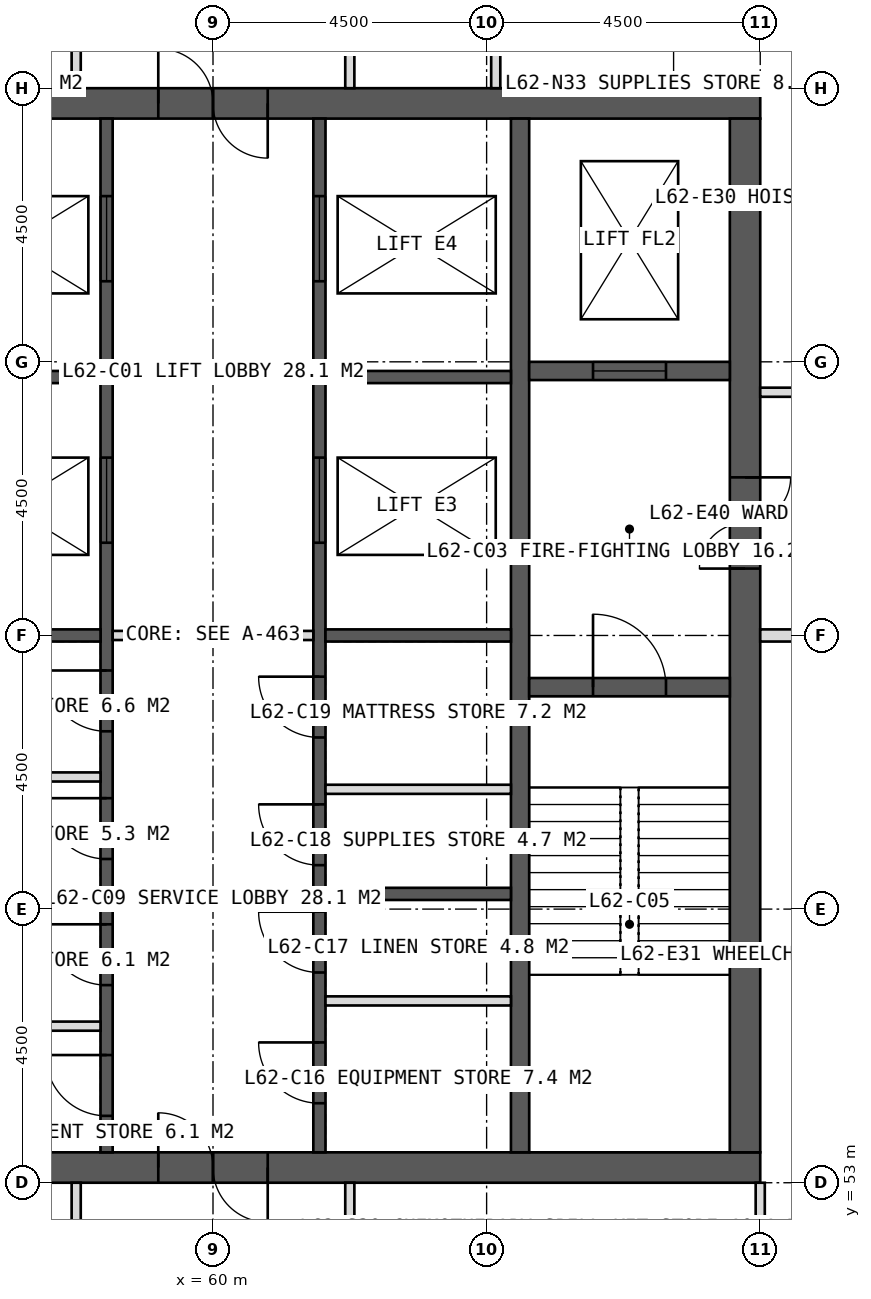
"""IFC4 building model, lengths in metres.
Left out: names, types, materials, properties, quantities, classifications, styles, units other than length and angle.
Written with IfcOpenShell. Run it as: python <this file> out.ifc"""

import sys

from ifc_helpers import new_model, si_unit, direction, frame, frame_2d, origin, place, context, subcontext, project, spatial, rectangle, extrude, element, fill, save


model = new_model("IFC4")
c1 = context("Model", 3, precision=1e-05, world=origin(), true_north=direction((0.0, 1.0)))
c2 = subcontext(c1, "Body", "Model", "MODEL_VIEW")
j1 = project(units=[si_unit("LENGTHUNIT", "METRE"), si_unit("PLANEANGLEUNIT", "RADIAN")], contexts=[c1])
p1 = place(None, origin())
s1 = spatial("IfcSite", under=j1, at=p1, CompositionType="ELEMENT")
p2 = place(p1, origin())
s2 = spatial("IfcBuilding", under=s1, at=p2, CompositionType="ELEMENT")
p3 = place(p2, frame((0.0, 0.0, 258.0)))
s3 = spatial("IfcBuildingStorey", under=s2, at=p3, CompositionType="ELEMENT", Elevation=258.0)
p4 = place(p3, frame((51.0, 70.75, 0.0), z_axis=(0.0, 0.0, 1.0), x_axis=(1.0, 0.0, 0.0)))
e1 = element("IfcWall", 1, at=p4, inside=s3, PredefinedType="SHEAR", context=c2, shape_type="SweptSolid", body=[
    extrude(rectangle(XDim=18.0, YDim=0.5, at=frame_2d((9.0, 0.0))), origin(), (0.0, 0.0, 1.0), 4.0),
])
p5 = place(p4, frame((8.1, 0.0, 0.0)))
e2 = element("IfcOpeningElement", 2, at=p5, cuts=e1, PredefinedType="OPENING", context=c2, shape_type="SweptSolid", body=[
    extrude(rectangle(XDim=1.8, YDim=2.2, at=frame_2d((0.9, 1.1))), frame((0.0, 0.26, 0.0), z_axis=(0.0, -1.0, 0.0), x_axis=(1.0, 0.0, 0.0)), (0.0, 0.0, 1.0), 0.52),
])
p6 = place(p3, frame((51.0, 53.25, 0.0), z_axis=(0.0, 0.0, 1.0), x_axis=(1.0, 0.0, 0.0)))
e3 = element("IfcWall", 3, at=p6, inside=s3, PredefinedType="SHEAR", context=c2, shape_type="SweptSolid", body=[
    extrude(rectangle(XDim=18.0, YDim=0.5, at=frame_2d((9.0, 0.0))), origin(), (0.0, 0.0, 1.0), 4.0),
])
p7 = place(p6, frame((8.1, 0.0, 0.0)))
e4 = element("IfcOpeningElement", 4, at=p7, cuts=e3, PredefinedType="OPENING", context=c2, shape_type="SweptSolid", body=[
    extrude(rectangle(XDim=1.8, YDim=2.2, at=frame_2d((0.9, 1.1))), frame((0.0, 0.26, 0.0), z_axis=(0.0, -1.0, 0.0), x_axis=(1.0, 0.0, 0.0)), (0.0, 0.0, 1.0), 0.52),
])
p8 = place(p3, frame((68.75, 53.5, 0.0), z_axis=(0.0, 0.0, 1.0), x_axis=(0.0, 1.0, 0.0)))
e5 = element("IfcWall", 5, at=p8, inside=s3, PredefinedType="SHEAR", context=c2, shape_type="SweptSolid", body=[
    extrude(rectangle(XDim=17.0, YDim=0.5, at=frame_2d((8.5, 0.0))), origin(), (0.0, 0.0, 1.0), 4.0),
])
p9 = place(p8, frame((9.6, 0.0, 0.0)))
e6 = element("IfcOpeningElement", 6, at=p9, cuts=e5, PredefinedType="OPENING", context=c2, shape_type="SweptSolid", body=[
    extrude(rectangle(XDim=1.5, YDim=2.2, at=frame_2d((0.75, 1.1))), frame((0.0, 0.26, 0.0), z_axis=(0.0, -1.0, 0.0), x_axis=(1.0, 0.0, 0.0)), (0.0, 0.0, 1.0), 0.52),
])
p10 = place(p3, frame((65.05, 53.5, 0.0), z_axis=(0.0, 0.0, 1.0), x_axis=(0.0, 1.0, 0.0)))
e7 = element("IfcWall", 7, at=p10, inside=s3, PredefinedType="SHEAR", context=c2, shape_type="SweptSolid", body=[
    extrude(rectangle(XDim=17.0, YDim=0.3, at=frame_2d((8.5, 0.0))), origin(), (0.0, 0.0, 1.0), 4.0),
])
p11 = place(p3, frame((58.25, 53.5, 0.0), z_axis=(0.0, 0.0, 1.0), x_axis=(0.0, 1.0, 0.0)))
e8 = element("IfcWall", 8, at=p11, inside=s3, PredefinedType="SHEAR", context=c2, shape_type="SweptSolid", body=[
    extrude(rectangle(XDim=17.0, YDim=0.2, at=frame_2d((8.5, 0.0))), origin(), (0.0, 0.0, 1.0), 4.0),
])
p12 = place(p11, frame((0.6, 0.0, 0.0)))
e9 = element("IfcOpeningElement", 9, at=p12, cuts=e8, PredefinedType="OPENING", context=c2, shape_type="SweptSolid", body=[
    extrude(rectangle(XDim=1.0, YDim=2.1, at=frame_2d((0.5, 1.05))), frame((0.0, 0.11, 0.0), z_axis=(0.0, -1.0, 0.0), x_axis=(1.0, 0.0, 0.0)), (0.0, 0.0, 1.0), 0.22),
])
p13 = place(p11, frame((2.75, 0.0, 0.0)))
e10 = element("IfcOpeningElement", 10, at=p13, cuts=e8, PredefinedType="OPENING", context=c2, shape_type="SweptSolid", body=[
    extrude(rectangle(XDim=1.0, YDim=2.1, at=frame_2d((0.5, 1.05))), frame((0.0, 0.11, 0.0), z_axis=(0.0, -1.0, 0.0), x_axis=(1.0, 0.0, 0.0)), (0.0, 0.0, 1.0), 0.22),
])
p14 = place(p11, frame((4.824, 0.0, 0.0)))
e11 = element("IfcOpeningElement", 11, at=p14, cuts=e8, PredefinedType="OPENING", context=c2, shape_type="SweptSolid", body=[
    extrude(rectangle(XDim=1.0, YDim=2.1, at=frame_2d((0.5, 1.05))), frame((0.0, 0.11, 0.0), z_axis=(0.0, -1.0, 0.0), x_axis=(1.0, 0.0, 0.0)), (0.0, 0.0, 1.0), 0.22),
])
p15 = place(p11, frame((6.924, 0.0, 0.0)))
e12 = element("IfcOpeningElement", 12, at=p15, cuts=e8, PredefinedType="OPENING", context=c2, shape_type="SweptSolid", body=[
    extrude(rectangle(XDim=1.0, YDim=2.1, at=frame_2d((0.5, 1.05))), frame((0.0, 0.11, 0.0), z_axis=(0.0, -1.0, 0.0), x_axis=(1.0, 0.0, 0.0)), (0.0, 0.0, 1.0), 0.22),
])
p16 = place(p11, frame((10.025, 0.0, 0.0)))
e13 = element("IfcOpeningElement", 13, at=p16, cuts=e8, PredefinedType="OPENING", context=c2, shape_type="SweptSolid", body=[
    extrude(rectangle(XDim=1.4, YDim=2.2, at=frame_2d((0.7, 1.1))), frame((0.0, 0.11, 0.0), z_axis=(0.0, -1.0, 0.0), x_axis=(1.0, 0.0, 0.0)), (0.0, 0.0, 1.0), 0.22),
])
p17 = place(p11, frame((14.325, 0.0, 0.0)))
e14 = element("IfcOpeningElement", 14, at=p17, cuts=e8, PredefinedType="OPENING", context=c2, shape_type="SweptSolid", body=[
    extrude(rectangle(XDim=1.4, YDim=2.2, at=frame_2d((0.7, 1.1))), frame((0.0, 0.11, 0.0), z_axis=(0.0, -1.0, 0.0), x_axis=(1.0, 0.0, 0.0)), (0.0, 0.0, 1.0), 0.22),
])
p18 = place(p3, frame((61.75, 53.5, 0.0), z_axis=(0.0, 0.0, 1.0), x_axis=(0.0, 1.0, 0.0)))
e15 = element("IfcWall", 15, at=p18, inside=s3, PredefinedType="SHEAR", context=c2, shape_type="SweptSolid", body=[
    extrude(rectangle(XDim=17.0, YDim=0.2, at=frame_2d((8.5, 0.0))), origin(), (0.0, 0.0, 1.0), 4.0),
])
p19 = place(p18, frame((0.808, 0.0, 0.0)))
e16 = element("IfcOpeningElement", 16, at=p19, cuts=e15, PredefinedType="OPENING", context=c2, shape_type="SweptSolid", body=[
    extrude(rectangle(XDim=1.0, YDim=2.1, at=frame_2d((0.5, 1.05))), frame((0.0, 0.11, 0.0), z_axis=(0.0, -1.0, 0.0), x_axis=(1.0, 0.0, 0.0)), (0.0, 0.0, 1.0), 0.22),
])
p20 = place(p18, frame((2.958, 0.0, 0.0)))
e17 = element("IfcOpeningElement", 17, at=p20, cuts=e15, PredefinedType="OPENING", context=c2, shape_type="SweptSolid", body=[
    extrude(rectangle(XDim=1.0, YDim=2.1, at=frame_2d((0.5, 1.05))), frame((0.0, 0.11, 0.0), z_axis=(0.0, -1.0, 0.0), x_axis=(1.0, 0.0, 0.0)), (0.0, 0.0, 1.0), 0.22),
])
p21 = place(p18, frame((4.722, 0.0, 0.0)))
e18 = element("IfcOpeningElement", 18, at=p21, cuts=e15, PredefinedType="OPENING", context=c2, shape_type="SweptSolid", body=[
    extrude(rectangle(XDim=1.0, YDim=2.1, at=frame_2d((0.5, 1.05))), frame((0.0, 0.11, 0.0), z_axis=(0.0, -1.0, 0.0), x_axis=(1.0, 0.0, 0.0)), (0.0, 0.0, 1.0), 0.22),
])
p22 = place(p18, frame((6.823, 0.0, 0.0)))
e19 = element("IfcOpeningElement", 19, at=p22, cuts=e15, PredefinedType="OPENING", context=c2, shape_type="SweptSolid", body=[
    extrude(rectangle(XDim=1.0, YDim=2.1, at=frame_2d((0.5, 1.05))), frame((0.0, 0.11, 0.0), z_axis=(0.0, -1.0, 0.0), x_axis=(1.0, 0.0, 0.0)), (0.0, 0.0, 1.0), 0.22),
])
p23 = place(p18, frame((10.025, 0.0, 0.0)))
e20 = element("IfcOpeningElement", 20, at=p23, cuts=e15, PredefinedType="OPENING", context=c2, shape_type="SweptSolid", body=[
    extrude(rectangle(XDim=1.4, YDim=2.2, at=frame_2d((0.7, 1.1))), frame((0.0, 0.11, 0.0), z_axis=(0.0, -1.0, 0.0), x_axis=(1.0, 0.0, 0.0)), (0.0, 0.0, 1.0), 0.22),
])
p24 = place(p18, frame((14.325, 0.0, 0.0)))
e21 = element("IfcOpeningElement", 21, at=p24, cuts=e15, PredefinedType="OPENING", context=c2, shape_type="SweptSolid", body=[
    extrude(rectangle(XDim=1.4, YDim=2.2, at=frame_2d((0.7, 1.1))), frame((0.0, 0.11, 0.0), z_axis=(0.0, -1.0, 0.0), x_axis=(1.0, 0.0, 0.0)), (0.0, 0.0, 1.0), 0.22),
])
for number, where, z_axis, x_axis in (
    (22, (55.1, 57.75, 0.0), (0.0, 0.0, 1.0), (1.0, 0.0, 0.0)),
    (23, (61.85, 57.75, 0.0), (0.0, 0.0, 1.0), (1.0, 0.0, 0.0)),
    (24, (55.1, 62.0, 0.0), (0.0, 0.0, 1.0), (1.0, 0.0, 0.0)),
    (25, (61.85, 62.0, 0.0), (0.0, 0.0, 1.0), (1.0, 0.0, 0.0)),
    (26, (55.1, 66.25, 0.0), (0.0, 0.0, 1.0), (1.0, 0.0, 0.0)),
    (27, (61.85, 66.25, 0.0), (0.0, 0.0, 1.0), (1.0, 0.0, 0.0)),
):
    element("IfcWall", number, at=place(p3, frame(where, z_axis=z_axis, x_axis=x_axis)), inside=s3, PredefinedType="SHEAR", context=c2, shape_type="SweptSolid", body=[
        extrude(rectangle(XDim=3.05, YDim=0.2, at=frame_2d((1.525, 0.0))), origin(), (0.0, 0.0, 1.0), 4.0),
    ])
p25 = place(p3, frame((65.2, 61.15, 0.0), z_axis=(0.0, 0.0, 1.0), x_axis=(1.0, 0.0, 0.0)))
e28 = element("IfcWall", 28, at=p25, inside=s3, PredefinedType="SHEAR", context=c2, shape_type="SweptSolid", body=[
    extrude(rectangle(XDim=3.3, YDim=0.3, at=frame_2d((1.65, 0.0))), origin(), (0.0, 0.0, 1.0), 4.0),
])
p26 = place(p25, frame((1.05, 0.0, 0.0)))
e29 = element("IfcOpeningElement", 29, at=p26, cuts=e28, PredefinedType="OPENING", context=c2, shape_type="SweptSolid", body=[
    extrude(rectangle(XDim=1.2, YDim=2.1, at=frame_2d((0.6, 1.05))), frame((0.0, 0.16, 0.0), z_axis=(0.0, -1.0, 0.0), x_axis=(1.0, 0.0, 0.0)), (0.0, 0.0, 1.0), 0.32),
])
p27 = place(p3, frame((65.2, 66.35, 0.0), z_axis=(0.0, 0.0, 1.0), x_axis=(1.0, 0.0, 0.0)))
e30 = element("IfcWall", 30, at=p27, inside=s3, PredefinedType="SHEAR", context=c2, shape_type="SweptSolid", body=[
    extrude(rectangle(XDim=3.3, YDim=0.3, at=frame_2d((1.65, 0.0))), origin(), (0.0, 0.0, 1.0), 4.0),
])
p28 = place(p27, frame((1.05, 0.0, 0.0)))
e31 = element("IfcOpeningElement", 31, at=p28, cuts=e30, PredefinedType="OPENING", context=c2, shape_type="SweptSolid", body=[
    extrude(rectangle(XDim=1.2, YDim=2.2, at=frame_2d((0.6, 1.1))), frame((0.0, 0.16, 0.0), z_axis=(0.0, -1.0, 0.0), x_axis=(1.0, 0.0, 0.0)), (0.0, 0.0, 1.0), 0.32),
])
for number, where, z_axis, x_axis in (
    (32, (57.75, 71.0, 0.0), (0.0, 0.0, 1.0), (0.0, 1.0, 0.0)),
    (33, (62.25, 71.0, 0.0), (0.0, 0.0, 1.0), (0.0, 1.0, 0.0)),
):
    element("IfcWall", number, at=place(p3, frame(where, z_axis=z_axis, x_axis=x_axis)), inside=s3, PredefinedType="PARTITIONING", context=c2, shape_type="SweptSolid", body=[
        extrude(rectangle(XDim=1.5, YDim=0.15, at=frame_2d((0.75, 0.0))), origin(), (0.0, 0.0, 1.0), 3.75),
    ])
p29 = place(p3, frame((64.65, 71.0, 0.0), z_axis=(0.0, 0.0, 1.0), x_axis=(0.0, 1.0, 0.0)))
e34 = element("IfcWall", 34, at=p29, inside=s3, PredefinedType="PARTITIONING", context=c2, shape_type="SweptSolid", body=[
    extrude(rectangle(XDim=1.5, YDim=0.15, at=frame_2d((0.75, 0.0))), origin(), (0.0, 0.0, 1.0), 2.95),
])
for number, where, z_axis, x_axis in (
    (35, (69.0, 53.0, 0.0), (0.0, 0.0, 1.0), (0.0, -1.0, 0.0)),
    (36, (62.25, 53.0, 0.0), (0.0, 0.0, 1.0), (0.0, -1.0, 0.0)),
    (37, (57.75, 53.0, 0.0), (0.0, 0.0, 1.0), (0.0, -1.0, 0.0)),
    (38, (69.0, 71.0, 0.0), (0.0, 0.0, 1.0), (1.0, 0.0, 0.0)),
    (39, (69.0, 66.0, 0.0), (0.0, 0.0, 1.0), (1.0, 0.0, 0.0)),
):
    element("IfcWall", number, at=place(p3, frame(where, z_axis=z_axis, x_axis=x_axis)), inside=s3, PredefinedType="PARTITIONING", context=c2, shape_type="SweptSolid", body=[
        extrude(rectangle(XDim=1.5, YDim=0.15, at=frame_2d((0.75, 0.0))), origin(), (0.0, 0.0, 1.0), 3.75),
    ])
p30 = place(p3, frame((69.0, 62.0, 0.0), z_axis=(0.0, 0.0, 1.0), x_axis=(1.0, 0.0, 0.0)))
e40 = element("IfcWall", 40, at=p30, inside=s3, PredefinedType="SOLIDWALL", context=c2, shape_type="SweptSolid", body=[
    extrude(rectangle(XDim=1.5, YDim=0.2, at=frame_2d((0.75, 0.0))), origin(), (0.0, 0.0, 1.0), 2.75),
])
for number, where, z_axis, x_axis in (
    (41, (55.1, 55.575, 0.0), (0.0, 0.0, 1.0), (1.0, 0.0, 0.0)),
    (42, (61.85, 55.99, 0.0), (0.0, 0.0, 1.0), (1.0, 0.0, 0.0)),
    (43, (55.1, 59.673, 0.0), (0.0, 0.0, 1.0), (1.0, 0.0, 0.0)),
    (44, (61.85, 59.47, 0.0), (0.0, 0.0, 1.0), (1.0, 0.0, 0.0)),
):
    element("IfcWall", number, at=place(p3, frame(where, z_axis=z_axis, x_axis=x_axis)), inside=s3, PredefinedType="PARTITIONING", context=c2, shape_type="SweptSolid", body=[
        extrude(rectangle(XDim=3.05, YDim=0.15, at=frame_2d((1.525, 0.0))), origin(), (0.0, 0.0, 1.0), 3.75),
    ])
p31 = place(p3, frame((58.35, 62.0, 0.0), z_axis=(0.0, 0.0, 1.0), x_axis=(1.0, 0.0, 0.0)))
e45 = element("IfcWall", 45, at=p31, inside=s3, PredefinedType="PARTITIONING", context=c2, shape_type="SweptSolid", body=[
    extrude(rectangle(XDim=3.3, YDim=0.15, at=frame_2d((1.65, 0.0))), origin(), (0.0, 0.0, 1.0), 3.75),
])
p32 = place(p5, origin())
e46 = element("IfcDoor", 46, at=p32, inside=s3, OperationType="DOUBLE_DOOR_SINGLE_SWING", PredefinedType="DOOR", context=c2, shape_type="SweptSolid", body=[
    extrude(rectangle(XDim=1.8, YDim=2.2, at=frame_2d((0.9, 1.1))), frame((0.0, 0.025, 0.0), z_axis=(0.0, -1.0, 0.0), x_axis=(1.0, 0.0, 0.0)), (0.0, 0.0, 1.0), 0.05),
])
fill(e2, e46)
p33 = place(p9, origin())
e47 = element("IfcDoor", 47, at=p33, inside=s3, OperationType="DOUBLE_DOOR_SINGLE_SWING", PredefinedType="DOOR", context=c2, shape_type="SweptSolid", body=[
    extrude(rectangle(XDim=1.5, YDim=2.2, at=frame_2d((0.75, 1.1))), frame((0.0, 0.025, 0.0), z_axis=(0.0, -1.0, 0.0), x_axis=(1.0, 0.0, 0.0)), (0.0, 0.0, 1.0), 0.05),
])
fill(e6, e47)
p34 = place(p26, origin())
e48 = element("IfcDoor", 48, at=p34, inside=s3, OperationType="SINGLE_SWING_LEFT", PredefinedType="DOOR", context=c2, shape_type="SweptSolid", body=[
    extrude(rectangle(XDim=1.2, YDim=2.1, at=frame_2d((0.6, 1.05))), frame((0.0, 0.025, 0.0), z_axis=(0.0, -1.0, 0.0), x_axis=(1.0, 0.0, 0.0)), (0.0, 0.0, 1.0), 0.05),
])
fill(e29, e48)
p35 = place(p28, origin())
e49 = element("IfcDoor", 49, at=p35, inside=s3, OperationType="SLIDING_TO_LEFT", PredefinedType="DOOR", context=c2, shape_type="SweptSolid", body=[
    extrude(rectangle(XDim=1.2, YDim=2.2, at=frame_2d((0.6, 1.1))), frame((0.0, 0.025, 0.0), z_axis=(0.0, -1.0, 0.0), x_axis=(1.0, 0.0, 0.0)), (0.0, 0.0, 1.0), 0.05),
])
fill(e31, e49)
p36 = place(p12, origin())
e50 = element("IfcDoor", 50, at=p36, inside=s3, OperationType="SINGLE_SWING_RIGHT", PredefinedType="DOOR", context=c2, shape_type="SweptSolid", body=[
    extrude(rectangle(XDim=1.0, YDim=2.1, at=frame_2d((0.5, 1.05))), frame((0.0, 0.025, 0.0), z_axis=(0.0, -1.0, 0.0), x_axis=(1.0, 0.0, 0.0)), (0.0, 0.0, 1.0), 0.05),
])
fill(e9, e50)
p37 = place(p13, origin())
e51 = element("IfcDoor", 51, at=p37, inside=s3, OperationType="SINGLE_SWING_RIGHT", PredefinedType="DOOR", context=c2, shape_type="SweptSolid", body=[
    extrude(rectangle(XDim=1.0, YDim=2.1, at=frame_2d((0.5, 1.05))), frame((0.0, 0.025, 0.0), z_axis=(0.0, -1.0, 0.0), x_axis=(1.0, 0.0, 0.0)), (0.0, 0.0, 1.0), 0.05),
])
fill(e10, e51)
p38 = place(p19, origin())
e52 = element("IfcDoor", 52, at=p38, inside=s3, OperationType="SINGLE_SWING_RIGHT", PredefinedType="DOOR", context=c2, shape_type="SweptSolid", body=[
    extrude(rectangle(XDim=1.0, YDim=2.1, at=frame_2d((0.5, 1.05))), frame((0.0, 0.025, 0.0), z_axis=(0.0, -1.0, 0.0), x_axis=(1.0, 0.0, 0.0)), (0.0, 0.0, 1.0), 0.05),
])
fill(e16, e52)
p39 = place(p20, origin())
e53 = element("IfcDoor", 53, at=p39, inside=s3, OperationType="SINGLE_SWING_RIGHT", PredefinedType="DOOR", context=c2, shape_type="SweptSolid", body=[
    extrude(rectangle(XDim=1.0, YDim=2.1, at=frame_2d((0.5, 1.05))), frame((0.0, 0.025, 0.0), z_axis=(0.0, -1.0, 0.0), x_axis=(1.0, 0.0, 0.0)), (0.0, 0.0, 1.0), 0.05),
])
fill(e17, e53)
p40 = place(p14, origin())
e54 = element("IfcDoor", 54, at=p40, inside=s3, OperationType="SINGLE_SWING_RIGHT", PredefinedType="DOOR", context=c2, shape_type="SweptSolid", body=[
    extrude(rectangle(XDim=1.0, YDim=2.1, at=frame_2d((0.5, 1.05))), frame((0.0, 0.025, 0.0), z_axis=(0.0, -1.0, 0.0), x_axis=(1.0, 0.0, 0.0)), (0.0, 0.0, 1.0), 0.05),
])
fill(e11, e54)
p41 = place(p15, origin())
e55 = element("IfcDoor", 55, at=p41, inside=s3, OperationType="SINGLE_SWING_RIGHT", PredefinedType="DOOR", context=c2, shape_type="SweptSolid", body=[
    extrude(rectangle(XDim=1.0, YDim=2.1, at=frame_2d((0.5, 1.05))), frame((0.0, 0.025, 0.0), z_axis=(0.0, -1.0, 0.0), x_axis=(1.0, 0.0, 0.0)), (0.0, 0.0, 1.0), 0.05),
])
fill(e12, e55)
p42 = place(p21, origin())
e56 = element("IfcDoor", 56, at=p42, inside=s3, OperationType="SINGLE_SWING_RIGHT", PredefinedType="DOOR", context=c2, shape_type="SweptSolid", body=[
    extrude(rectangle(XDim=1.0, YDim=2.1, at=frame_2d((0.5, 1.05))), frame((0.0, 0.025, 0.0), z_axis=(0.0, -1.0, 0.0), x_axis=(1.0, 0.0, 0.0)), (0.0, 0.0, 1.0), 0.05),
])
fill(e18, e56)
p43 = place(p22, origin())
e57 = element("IfcDoor", 57, at=p43, inside=s3, OperationType="SINGLE_SWING_RIGHT", PredefinedType="DOOR", context=c2, shape_type="SweptSolid", body=[
    extrude(rectangle(XDim=1.0, YDim=2.1, at=frame_2d((0.5, 1.05))), frame((0.0, 0.025, 0.0), z_axis=(0.0, -1.0, 0.0), x_axis=(1.0, 0.0, 0.0)), (0.0, 0.0, 1.0), 0.05),
])
fill(e19, e57)
p44 = place(p16, origin())
e58 = element("IfcDoor", 58, at=p44, inside=s3, OperationType="SLIDING_TO_LEFT", PredefinedType="DOOR", context=c2, shape_type="SweptSolid", body=[
    extrude(rectangle(XDim=1.4, YDim=2.2, at=frame_2d((0.7, 1.1))), frame((0.0, 0.025, 0.0), z_axis=(0.0, -1.0, 0.0), x_axis=(1.0, 0.0, 0.0)), (0.0, 0.0, 1.0), 0.05),
])
fill(e13, e58)
p45 = place(p23, origin())
e59 = element("IfcDoor", 59, at=p45, inside=s3, OperationType="SLIDING_TO_LEFT", PredefinedType="DOOR", context=c2, shape_type="SweptSolid", body=[
    extrude(rectangle(XDim=1.4, YDim=2.2, at=frame_2d((0.7, 1.1))), frame((0.0, 0.025, 0.0), z_axis=(0.0, -1.0, 0.0), x_axis=(1.0, 0.0, 0.0)), (0.0, 0.0, 1.0), 0.05),
])
fill(e20, e59)
p46 = place(p17, origin())
e60 = element("IfcDoor", 60, at=p46, inside=s3, OperationType="SLIDING_TO_LEFT", PredefinedType="DOOR", context=c2, shape_type="SweptSolid", body=[
    extrude(rectangle(XDim=1.4, YDim=2.2, at=frame_2d((0.7, 1.1))), frame((0.0, 0.025, 0.0), z_axis=(0.0, -1.0, 0.0), x_axis=(1.0, 0.0, 0.0)), (0.0, 0.0, 1.0), 0.05),
])
fill(e14, e60)
p47 = place(p24, origin())
e61 = element("IfcDoor", 61, at=p47, inside=s3, OperationType="SLIDING_TO_LEFT", PredefinedType="DOOR", context=c2, shape_type="SweptSolid", body=[
    extrude(rectangle(XDim=1.4, YDim=2.2, at=frame_2d((0.7, 1.1))), frame((0.0, 0.025, 0.0), z_axis=(0.0, -1.0, 0.0), x_axis=(1.0, 0.0, 0.0)), (0.0, 0.0, 1.0), 0.05),
])
fill(e21, e61)
p48 = place(p7, origin())
e62 = element("IfcDoor", 62, at=p48, inside=s3, OperationType="DOUBLE_DOOR_SINGLE_SWING", PredefinedType="DOOR", context=c2, shape_type="SweptSolid", body=[
    extrude(rectangle(XDim=1.8, YDim=2.2, at=frame_2d((0.9, 1.1))), frame((0.0, 0.025, 0.0), z_axis=(0.0, -1.0, 0.0), x_axis=(1.0, 0.0, 0.0)), (0.0, 0.0, 1.0), 0.05),
])
fill(e4, e62)
save(model, sys.argv[1])
